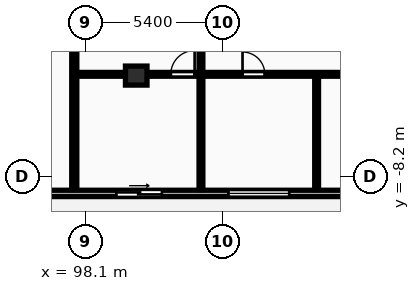
"""IFC4 building model, lengths in metres.
Left out: names, types, materials, properties, quantities, classifications, styles, units other than length and angle.
Written with IfcOpenShell. Run it as: python <this file> out.ifc"""

import sys

from ifc_helpers import new_model, si_unit, direction, frame, frame_2d, origin, origin_2d, place, context, subcontext, project, spatial, rectangle, extrude, element, fill, save


model = new_model("IFC4")
c1 = context("Model", 3, precision=1e-05, world=origin(), true_north=direction((0.0, 1.0)))
c2 = subcontext(c1, "Body", "Model", "MODEL_VIEW")
j1 = project(units=[si_unit("LENGTHUNIT", "METRE"), si_unit("PLANEANGLEUNIT", "RADIAN")], contexts=[c1])
p1 = place(None, origin())
s1 = spatial("IfcSite", under=j1, at=p1, CompositionType="ELEMENT")
p2 = place(p1, origin())
s2 = spatial("IfcBuilding", under=s1, at=p2, CompositionType="ELEMENT")
p3 = place(p2, frame((0.0, 0.0, 132.8)))
s3 = spatial("IfcBuildingStorey", under=s2, at=p3, CompositionType="ELEMENT", Elevation=132.8)
p4 = place(p3, frame((100.1, -4.2, 0.0), z_axis=(0.0, 0.0, 1.0), x_axis=(1.0, 0.0, 0.0)))
e1 = element("IfcColumn", 1, at=p4, inside=s3, PredefinedType="COLUMN", context=c2, shape_type="SweptSolid", body=[
    extrude(rectangle(XDim=0.85, YDim=0.75, at=origin_2d()), origin(), (0.0, 0.0, 1.0), 3.25),
])
p5 = place(p3, frame((72.7, -8.85, 0.0), z_axis=(0.0, 0.0, 1.0), x_axis=(1.0, 0.0, 0.0)))
e2 = element("IfcWall", 2, at=p5, inside=s3, PredefinedType="STANDARD", context=c2, shape_type="SweptSolid", body=[
    extrude(rectangle(XDim=58.0, YDim=0.25, at=frame_2d((29.0, 0.0))), origin(), (0.0, 0.0, 1.0), 2.97),
])
p6 = place(p5, frame((6.19, 0.0, 0.85)))
e3 = element("IfcOpeningElement", 3, at=p6, cuts=e2, PredefinedType="OPENING", context=c2, shape_type="SweptSolid", body=[
    extrude(rectangle(XDim=2.4, YDim=1.9, at=frame_2d((1.2, 0.95))), frame((0.0, 0.135, 0.0), z_axis=(0.0, -1.0, 0.0), x_axis=(1.0, 0.0, 0.0)), (0.0, 0.0, 1.0), 0.27),
])
p7 = place(p5, frame((11.39, 0.0, 0.85)))
e4 = element("IfcOpeningElement", 4, at=p7, cuts=e2, PredefinedType="OPENING", context=c2, shape_type="SweptSolid", body=[
    extrude(rectangle(XDim=2.4, YDim=1.9, at=frame_2d((1.2, 0.95))), frame((0.0, 0.135, 0.0), z_axis=(0.0, -1.0, 0.0), x_axis=(1.0, 0.0, 0.0)), (0.0, 0.0, 1.0), 0.27),
])
p8 = place(p5, frame((16.535, 0.0, 0.85)))
e5 = element("IfcOpeningElement", 5, at=p8, cuts=e2, PredefinedType="OPENING", context=c2, shape_type="SweptSolid", body=[
    extrude(rectangle(XDim=2.4, YDim=1.9, at=frame_2d((1.2, 0.95))), frame((0.0, 0.135, 0.0), z_axis=(0.0, -1.0, 0.0), x_axis=(1.0, 0.0, 0.0)), (0.0, 0.0, 1.0), 0.27),
])
p9 = place(p5, frame((1.555, 0.0, 0.0)))
e6 = element("IfcOpeningElement", 6, at=p9, cuts=e2, PredefinedType="OPENING", context=c2, shape_type="SweptSolid", body=[
    extrude(rectangle(XDim=1.8, YDim=2.2, at=frame_2d((0.9, 1.1))), frame((0.0, 0.135, 0.0), z_axis=(0.0, -1.0, 0.0), x_axis=(1.0, 0.0, 0.0)), (0.0, 0.0, 1.0), 0.27),
])
p10 = place(p5, frame((21.357, 0.0, 0.85)))
e7 = element("IfcOpeningElement", 7, at=p10, cuts=e2, PredefinedType="OPENING", context=c2, shape_type="SweptSolid", body=[
    extrude(rectangle(XDim=2.4, YDim=1.9, at=frame_2d((1.2, 0.95))), frame((0.0, 0.135, 0.0), z_axis=(0.0, -1.0, 0.0), x_axis=(1.0, 0.0, 0.0)), (0.0, 0.0, 1.0), 0.27),
])
p11 = place(p5, frame((31.037, 0.0, 0.85)))
e8 = element("IfcOpeningElement", 8, at=p11, cuts=e2, PredefinedType="OPENING", context=c2, shape_type="SweptSolid", body=[
    extrude(rectangle(XDim=2.4, YDim=1.9, at=frame_2d((1.2, 0.95))), frame((0.0, 0.135, 0.0), z_axis=(0.0, -1.0, 0.0), x_axis=(1.0, 0.0, 0.0)), (0.0, 0.0, 1.0), 0.27),
])
p12 = place(p5, frame((35.578, 0.0, 0.85)))
e9 = element("IfcOpeningElement", 9, at=p12, cuts=e2, PredefinedType="OPENING", context=c2, shape_type="SweptSolid", body=[
    extrude(rectangle(XDim=2.4, YDim=1.9, at=frame_2d((1.2, 0.95))), frame((0.0, 0.135, 0.0), z_axis=(0.0, -1.0, 0.0), x_axis=(1.0, 0.0, 0.0)), (0.0, 0.0, 1.0), 0.27),
])
p13 = place(p5, frame((26.615, 0.0, 0.0)))
e10 = element("IfcOpeningElement", 10, at=p13, cuts=e2, PredefinedType="OPENING", context=c2, shape_type="SweptSolid", body=[
    extrude(rectangle(XDim=1.8, YDim=2.2, at=frame_2d((0.9, 1.1))), frame((0.0, 0.135, 0.0), z_axis=(0.0, -1.0, 0.0), x_axis=(1.0, 0.0, 0.0)), (0.0, 0.0, 1.0), 0.27),
])
p14 = place(p5, frame((40.051, 0.0, 0.85)))
e11 = element("IfcOpeningElement", 11, at=p14, cuts=e2, PredefinedType="OPENING", context=c2, shape_type="SweptSolid", body=[
    extrude(rectangle(XDim=2.4, YDim=1.9, at=frame_2d((1.2, 0.95))), frame((0.0, 0.135, 0.0), z_axis=(0.0, -1.0, 0.0), x_axis=(1.0, 0.0, 0.0)), (0.0, 0.0, 1.0), 0.27),
])
p15 = place(p5, frame((48.113, 0.0, 0.0)))
e12 = element("IfcOpeningElement", 12, at=p15, cuts=e2, PredefinedType="OPENING", context=c2, shape_type="SweptSolid", body=[
    extrude(rectangle(XDim=1.8, YDim=2.2, at=frame_2d((0.9, 1.1))), frame((0.0, 0.135, 0.0), z_axis=(0.0, -1.0, 0.0), x_axis=(1.0, 0.0, 0.0)), (0.0, 0.0, 1.0), 0.27),
])
p16 = place(p5, frame((54.9, 0.0, 0.85)))
e13 = element("IfcOpeningElement", 13, at=p16, cuts=e2, PredefinedType="OPENING", context=c2, shape_type="SweptSolid", body=[
    extrude(rectangle(XDim=2.4, YDim=1.9, at=frame_2d((1.2, 0.95))), frame((0.0, 0.135, 0.0), z_axis=(0.0, -1.0, 0.0), x_axis=(1.0, 0.0, 0.0)), (0.0, 0.0, 1.0), 0.27),
])
p17 = place(p3, frame((97.655, -8.7, 0.0), z_axis=(0.0, 0.0, 1.0), x_axis=(0.0, 1.0, 0.0)))
e14 = element("IfcWall", 14, at=p17, inside=s3, PredefinedType="PARTITIONING", context=c2, shape_type="SweptSolid", body=[
    extrude(rectangle(XDim=24.57, YDim=0.2, at=frame_2d((12.285, 0.0))), origin(), (0.0, 0.0, 1.0), 2.97),
])
p18 = place(p3, frame((107.22, -8.7, 0.0), z_axis=(0.0, 0.0, 1.0), x_axis=(0.0, 1.0, 0.0)))
e15 = element("IfcWall", 15, at=p18, inside=s3, PredefinedType="PARTITIONING", context=c2, shape_type="SweptSolid", body=[
    extrude(rectangle(XDim=4.47, YDim=0.15, at=frame_2d((2.235, 0.0))), origin(), (0.0, 0.0, 1.0), 2.97),
])
p19 = place(p3, frame((102.655, -8.7, 0.0), z_axis=(0.0, 0.0, 1.0), x_axis=(0.0, 1.0, 0.0)))
e16 = element("IfcWall", 16, at=p19, inside=s3, PredefinedType="PARTITIONING", context=c2, shape_type="SweptSolid", body=[
    extrude(rectangle(XDim=9.61, YDim=0.15, at=frame_2d((4.805, 0.0))), origin(), (0.0, 0.0, 1.0), 2.97),
])
p20 = place(p19, frame((5.92, 0.0, 0.0)))
e17 = element("IfcOpeningElement", 17, at=p20, cuts=e16, PredefinedType="OPENING", context=c2, shape_type="SweptSolid", body=[
    extrude(rectangle(XDim=0.92, YDim=2.08, at=frame_2d((0.46, 1.04))), frame((0.0, 0.085, 0.0), z_axis=(0.0, -1.0, 0.0), x_axis=(1.0, 0.0, 0.0)), (0.0, 0.0, 1.0), 0.17),
])
p21 = place(p3, frame((97.735, -4.15, 0.0), z_axis=(0.0, 0.0, 1.0), x_axis=(1.0, 0.0, 0.0)))
e18 = element("IfcWall", 18, at=p21, inside=s3, PredefinedType="PARTITIONING", context=c2, shape_type="SweptSolid", body=[
    extrude(rectangle(XDim=14.002, YDim=0.15, at=frame_2d((7.001, 0.0))), origin(), (0.0, 0.0, 1.0), 2.663),
])
p22 = place(p21, frame((3.73, 0.0, 0.0)))
e19 = element("IfcOpeningElement", 19, at=p22, cuts=e18, PredefinedType="OPENING", context=c2, shape_type="SweptSolid", body=[
    extrude(rectangle(XDim=0.94, YDim=2.1, at=frame_2d((0.47, 1.05))), frame((0.0, 0.085, 0.0), z_axis=(0.0, -1.0, 0.0), x_axis=(1.0, 0.0, 0.0)), (0.0, 0.0, 1.0), 0.17),
])
p23 = place(p21, frame((6.561, 0.0, 0.0)))
e20 = element("IfcOpeningElement", 20, at=p23, cuts=e18, PredefinedType="OPENING", context=c2, shape_type="SweptSolid", body=[
    extrude(rectangle(XDim=0.88, YDim=2.06, at=frame_2d((0.44, 1.03))), frame((0.0, 0.085, 0.0), z_axis=(0.0, -1.0, 0.0), x_axis=(1.0, 0.0, 0.0)), (0.0, 0.0, 1.0), 0.17),
])
p24 = place(p21, frame((12.902, 0.0, 0.0)))
e21 = element("IfcOpeningElement", 21, at=p24, cuts=e18, PredefinedType="OPENING", context=c2, shape_type="SweptSolid", body=[
    extrude(rectangle(XDim=0.88, YDim=2.06, at=frame_2d((0.44, 1.03))), frame((0.0, 0.085, 0.0), z_axis=(0.0, -1.0, 0.0), x_axis=(1.0, 0.0, 0.0)), (0.0, 0.0, 1.0), 0.17),
])
p25 = place(p11, origin())
e22 = element("IfcWindow", 22, at=p25, inside=s3, PartitioningType="DOUBLE_PANEL_VERTICAL", PredefinedType="WINDOW", context=c2, shape_type="SweptSolid", body=[
    extrude(rectangle(XDim=2.4, YDim=1.9, at=frame_2d((1.2, 0.95))), frame((0.0, 0.03, 0.0), z_axis=(0.0, -1.0, 0.0), x_axis=(1.0, 0.0, 0.0)), (0.0, 0.0, 1.0), 0.06),
])
fill(e8, e22)
p26 = place(p13, origin())
e23 = element("IfcDoor", 23, at=p26, inside=s3, OperationType="SLIDING_TO_RIGHT", PredefinedType="DOOR", context=c2, shape_type="SweptSolid", body=[
    extrude(rectangle(XDim=1.8, YDim=2.2, at=frame_2d((0.9, 1.1))), frame((0.0, 0.025, 0.0), z_axis=(0.0, -1.0, 0.0), x_axis=(1.0, 0.0, 0.0)), (0.0, 0.0, 1.0), 0.05),
])
fill(e10, e23)
p27 = place(p22, origin())
e24 = element("IfcDoor", 24, at=p27, inside=s3, OperationType="SINGLE_SWING_RIGHT", PredefinedType="DOOR", context=c2, shape_type="SweptSolid", body=[
    extrude(rectangle(XDim=0.94, YDim=2.1, at=frame_2d((0.47, 1.05))), frame((0.0, 0.025, 0.0), z_axis=(0.0, -1.0, 0.0), x_axis=(1.0, 0.0, 0.0)), (0.0, 0.0, 1.0), 0.05),
])
fill(e19, e24)
p28 = place(p23, origin())
e25 = element("IfcDoor", 25, at=p28, inside=s3, OperationType="SINGLE_SWING_LEFT", PredefinedType="DOOR", context=c2, shape_type="SweptSolid", body=[
    extrude(rectangle(XDim=0.88, YDim=2.06, at=frame_2d((0.44, 1.03))), frame((0.0, 0.025, 0.0), z_axis=(0.0, -1.0, 0.0), x_axis=(1.0, 0.0, 0.0)), (0.0, 0.0, 1.0), 0.05),
])
fill(e20, e25)
save(model, sys.argv[1])
